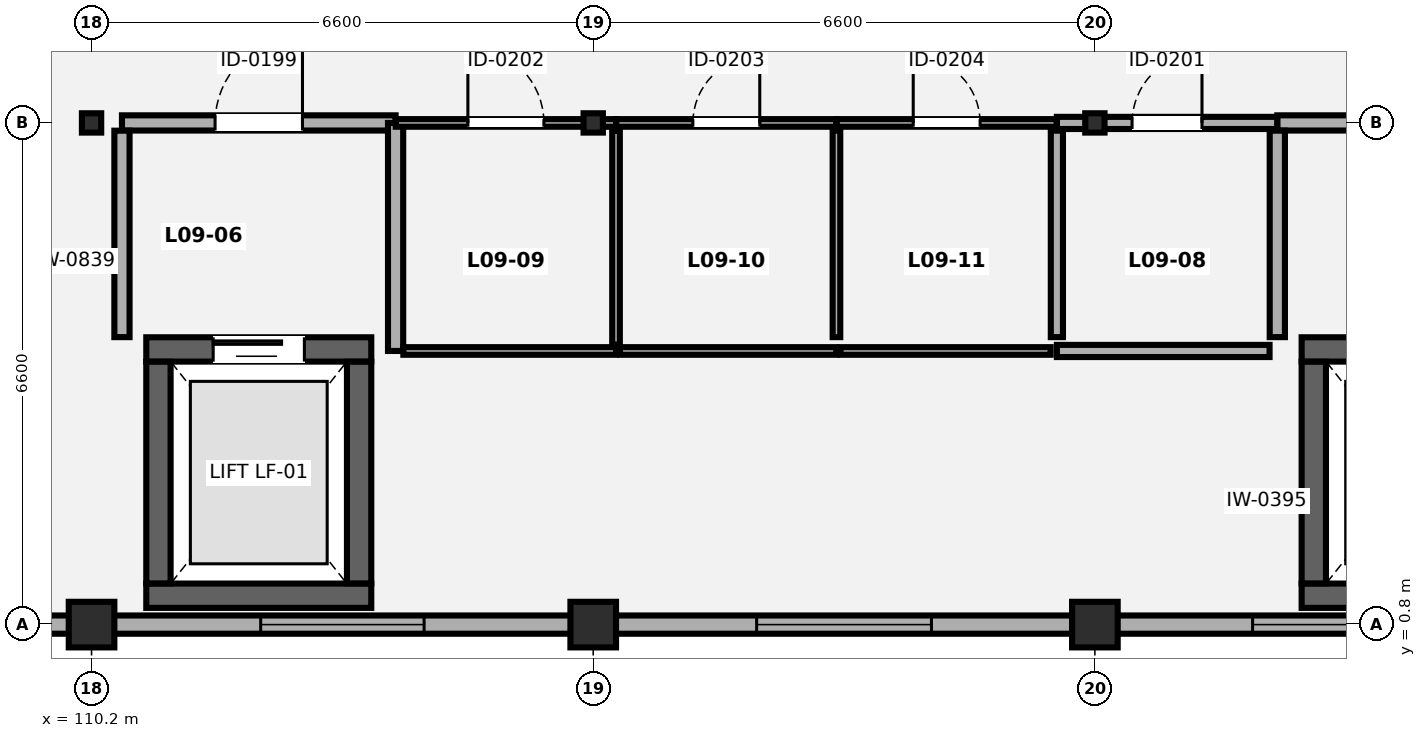
"""IFC4 building model, lengths in metres.
Left out: names, types, materials, properties, quantities, classifications, styles, units other than length and angle.
Written with IfcOpenShell. Run it as: python <this file> out.ifc"""

import sys

from ifc_helpers import new_model, si_unit, direction, frame, frame_2d, origin, origin_2d, place, context, subcontext, project, spatial, rectangle, circle, i_section, extrude, element, fill, save


model = new_model("IFC4")
c1 = context("Model", 3, precision=1e-05, world=origin(), true_north=direction((0.0, 1.0)))
c2 = subcontext(c1, "Body", "Model", "MODEL_VIEW")
j1 = project(units=[si_unit("LENGTHUNIT", "METRE"), si_unit("PLANEANGLEUNIT", "RADIAN")], contexts=[c1])
p1 = place(None, origin())
s1 = spatial("IfcSite", under=j1, at=p1, CompositionType="ELEMENT")
p2 = place(p1, origin())
s2 = spatial("IfcBuilding", under=s1, at=p2, CompositionType="ELEMENT")
p3 = place(p2, frame((0.0, 0.0, 38.15)))
s3 = spatial("IfcBuildingStorey", under=s2, at=p3, CompositionType="ELEMENT", Elevation=38.15)
p4 = place(p3, frame((110.2, 0.8, 0.0), z_axis=(0.0, 0.0, 1.0), x_axis=(1.0, 0.0, 0.0)))
e1 = element("IfcColumn", 1, at=p4, inside=s3, PredefinedType="PILASTER", context=c2, shape_type="SweptSolid", body=[
    extrude(circle(Radius=0.3, at=origin_2d()), origin(), (0.0, 0.0, 1.0), 3.85),
])
p5 = place(p3, frame((110.2, 7.4, 0.0), z_axis=(0.0, 0.0, 1.0), x_axis=(1.0, 0.0, 0.0)))
e2 = element("IfcColumn", 2, at=p5, inside=s3, PredefinedType="COLUMN", context=c2, shape_type="SweptSolid", body=[
    extrude(i_section(OverallWidth=0.254, OverallDepth=0.254, WebThickness=0.009, FlangeThickness=0.014, FilletRadius=0.014, at=origin_2d()), origin(), (0.0, 0.0, 1.0), 3.85),
])
p6 = place(p3, frame((116.8, 0.8, 0.0), z_axis=(0.0, 0.0, 1.0), x_axis=(1.0, 0.0, 0.0)))
e3 = element("IfcColumn", 3, at=p6, inside=s3, PredefinedType="PILASTER", context=c2, shape_type="SweptSolid", body=[
    extrude(circle(Radius=0.3, at=origin_2d()), origin(), (0.0, 0.0, 1.0), 3.85),
])
p7 = place(p3, frame((116.8, 7.4, 0.0), z_axis=(0.0, 0.0, 1.0), x_axis=(1.0, 0.0, 0.0)))
e4 = element("IfcColumn", 4, at=p7, inside=s3, PredefinedType="COLUMN", context=c2, shape_type="SweptSolid", body=[
    extrude(i_section(OverallWidth=0.254, OverallDepth=0.254, WebThickness=0.009, FlangeThickness=0.014, FilletRadius=0.014, at=origin_2d()), origin(), (0.0, 0.0, 1.0), 3.85),
])
p8 = place(p3, frame((123.4, 0.8, 0.0), z_axis=(0.0, 0.0, 1.0), x_axis=(1.0, 0.0, 0.0)))
e5 = element("IfcColumn", 5, at=p8, inside=s3, PredefinedType="PILASTER", context=c2, shape_type="SweptSolid", body=[
    extrude(circle(Radius=0.3, at=origin_2d()), origin(), (0.0, 0.0, 1.0), 3.85),
])
p9 = place(p3, frame((123.4, 7.4, 0.0), z_axis=(0.0, 0.0, 1.0), x_axis=(1.0, 0.0, 0.0)))
e6 = element("IfcColumn", 6, at=p9, inside=s3, PredefinedType="COLUMN", context=c2, shape_type="SweptSolid", body=[
    extrude(i_section(OverallWidth=0.254, OverallDepth=0.254, WebThickness=0.009, FlangeThickness=0.014, FilletRadius=0.014, at=origin_2d()), origin(), (0.0, 0.0, 1.0), 3.85),
])
p10 = place(p3, frame((149.502, 0.8, 0.0), z_axis=(0.0, 0.0, 1.0), x_axis=(-1.0, 0.0, 0.0)))
e7 = element("IfcWall", 7, at=p10, inside=s3, PredefinedType="SOLIDWALL", context=c2, shape_type="SweptSolid", body=[
    extrude(rectangle(XDim=45.604, YDim=0.24, at=frame_2d((22.802, 0.0))), origin(), (0.0, 0.0, 1.0), 3.155),
])
p11 = place(p10, frame((41.602, 0.0, 0.85)))
e8 = element("IfcOpeningElement", 8, at=p11, cuts=e7, PredefinedType="OPENING", context=c2, shape_type="SweptSolid", body=[
    extrude(rectangle(XDim=2.0, YDim=1.4, at=frame_2d((1.0, 0.7))), frame((0.0, 0.13, 0.0), z_axis=(0.0, -1.0, 0.0), x_axis=(1.0, 0.0, 0.0)), (0.0, 0.0, 1.0), 0.26),
])
p12 = place(p10, frame((34.927, 0.0, 0.85)))
e9 = element("IfcOpeningElement", 9, at=p12, cuts=e7, PredefinedType="OPENING", context=c2, shape_type="SweptSolid", body=[
    extrude(rectangle(XDim=2.15, YDim=1.4, at=frame_2d((1.075, 0.7))), frame((0.0, 0.13, 0.0), z_axis=(0.0, -1.0, 0.0), x_axis=(1.0, 0.0, 0.0)), (0.0, 0.0, 1.0), 0.26),
])
p13 = place(p10, frame((28.252, 0.0, 0.85)))
e10 = element("IfcOpeningElement", 10, at=p13, cuts=e7, PredefinedType="OPENING", context=c2, shape_type="SweptSolid", body=[
    extrude(rectangle(XDim=2.3, YDim=1.4, at=frame_2d((1.15, 0.7))), frame((0.0, 0.13, 0.0), z_axis=(0.0, -1.0, 0.0), x_axis=(1.0, 0.0, 0.0)), (0.0, 0.0, 1.0), 0.26),
])
p14 = place(p10, frame((21.577, 0.0, 0.85)))
e11 = element("IfcOpeningElement", 11, at=p14, cuts=e7, PredefinedType="OPENING", context=c2, shape_type="SweptSolid", body=[
    extrude(rectangle(XDim=2.45, YDim=1.4, at=frame_2d((1.225, 0.7))), frame((0.0, 0.13, 0.0), z_axis=(0.0, -1.0, 0.0), x_axis=(1.0, 0.0, 0.0)), (0.0, 0.0, 1.0), 0.26),
])
p15 = place(p10, frame((15.602, 0.0, 0.85)))
e12 = element("IfcOpeningElement", 12, at=p15, cuts=e7, PredefinedType="OPENING", context=c2, shape_type="SweptSolid", body=[
    extrude(rectangle(XDim=1.2, YDim=1.25, at=frame_2d((0.6, 0.625))), frame((0.0, 0.13, 0.0), z_axis=(0.0, -1.0, 0.0), x_axis=(1.0, 0.0, 0.0)), (0.0, 0.0, 1.0), 0.26),
])
p16 = place(p10, frame((8.877, 0.0, 0.85)))
e13 = element("IfcOpeningElement", 13, at=p16, cuts=e7, PredefinedType="OPENING", context=c2, shape_type="SweptSolid", body=[
    extrude(rectangle(XDim=1.45, YDim=1.25, at=frame_2d((0.725, 0.625))), frame((0.0, 0.13, 0.0), z_axis=(0.0, -1.0, 0.0), x_axis=(1.0, 0.0, 0.0)), (0.0, 0.0, 1.0), 0.26),
])
p17 = place(p10, frame((2.177, 0.0, 0.85)))
e14 = element("IfcOpeningElement", 14, at=p17, cuts=e7, PredefinedType="OPENING", context=c2, shape_type="SweptSolid", body=[
    extrude(rectangle(XDim=1.65, YDim=1.25, at=frame_2d((0.825, 0.625))), frame((0.0, 0.13, 0.0), z_axis=(0.0, -1.0, 0.0), x_axis=(1.0, 0.0, 0.0)), (0.0, 0.0, 1.0), 0.26),
])
p18 = place(p3, frame((110.92, 1.18, 0.0), z_axis=(0.0, 0.0, 1.0), x_axis=(1.0, 0.0, 0.0)))
e15 = element("IfcWall", 15, at=p18, inside=s3, PredefinedType="SHEAR", context=c2, shape_type="SweptSolid", body=[
    extrude(rectangle(XDim=2.96, YDim=0.32, at=frame_2d((1.48, 0.0))), origin(), (0.0, 0.0, 1.0), 3.67),
])
p19 = place(p3, frame((110.92, 4.42, 0.0), z_axis=(0.0, 0.0, 1.0), x_axis=(1.0, 0.0, 0.0)))
e16 = element("IfcWall", 16, at=p19, inside=s3, PredefinedType="SHEAR", context=c2, shape_type="SweptSolid", body=[
    extrude(rectangle(XDim=2.96, YDim=0.32, at=frame_2d((1.48, 0.0))), origin(), (0.0, 0.0, 1.0), 3.67),
])
p20 = place(p19, frame((0.88, 0.0, 0.0)))
e17 = element("IfcOpeningElement", 17, at=p20, cuts=e16, PredefinedType="OPENING", context=c2, shape_type="SweptSolid", body=[
    extrude(rectangle(XDim=1.2, YDim=2.2, at=frame_2d((0.6, 1.1))), frame((0.0, 0.17, 0.0), z_axis=(0.0, -1.0, 0.0), x_axis=(1.0, 0.0, 0.0)), (0.0, 0.0, 1.0), 0.34),
])
for number, where, z_axis, x_axis in (
    (18, (111.08, 1.342, 0.0), (0.0, 0.0, 1.0), (0.0, 1.0, 0.0)),
    (19, (113.72, 1.342, 0.0), (0.0, 0.0, 1.0), (0.0, 1.0, 0.0)),
):
    element("IfcWall", number, at=place(p3, frame(where, z_axis=z_axis, x_axis=x_axis)), inside=s3, PredefinedType="SHEAR", context=c2, shape_type="SweptSolid", body=[
        extrude(rectangle(XDim=2.916, YDim=0.32, at=frame_2d((1.458, 0.0))), origin(), (0.0, 0.0, 1.0), 3.67),
    ])
p21 = place(p3, frame((126.12, 1.18, 0.0), z_axis=(0.0, 0.0, 1.0), x_axis=(1.0, 0.0, 0.0)))
e20 = element("IfcWall", 20, at=p21, inside=s3, PredefinedType="SHEAR", context=c2, shape_type="SweptSolid", body=[
    extrude(rectangle(XDim=2.96, YDim=0.32, at=frame_2d((1.48, 0.0))), origin(), (0.0, 0.0, 1.0), 3.67),
])
p22 = place(p3, frame((126.12, 4.42, 0.0), z_axis=(0.0, 0.0, 1.0), x_axis=(1.0, 0.0, 0.0)))
e21 = element("IfcWall", 21, at=p22, inside=s3, PredefinedType="SHEAR", context=c2, shape_type="SweptSolid", body=[
    extrude(rectangle(XDim=2.96, YDim=0.32, at=frame_2d((1.48, 0.0))), origin(), (0.0, 0.0, 1.0), 3.67),
])
p23 = place(p22, frame((0.88, 0.0, 0.0)))
e22 = element("IfcOpeningElement", 22, at=p23, cuts=e21, PredefinedType="OPENING", context=c2, shape_type="SweptSolid", body=[
    extrude(rectangle(XDim=1.2, YDim=2.2, at=frame_2d((0.6, 1.1))), frame((0.0, 0.17, 0.0), z_axis=(0.0, -1.0, 0.0), x_axis=(1.0, 0.0, 0.0)), (0.0, 0.0, 1.0), 0.34),
])
p24 = place(p3, frame((126.28, 1.342, 0.0), z_axis=(0.0, 0.0, 1.0), x_axis=(0.0, 1.0, 0.0)))
e23 = element("IfcWall", 23, at=p24, inside=s3, PredefinedType="SHEAR", context=c2, shape_type="SweptSolid", body=[
    extrude(rectangle(XDim=2.916, YDim=0.32, at=frame_2d((1.458, 0.0))), origin(), (0.0, 0.0, 1.0), 3.67),
])
p25 = place(p3, frame((110.6, 7.4, 0.0), z_axis=(0.0, 0.0, 1.0), x_axis=(1.0, 0.0, 0.0)))
e24 = element("IfcWall", 24, at=p25, inside=s3, PredefinedType="SOLIDWALL", context=c2, shape_type="SweptSolid", body=[
    extrude(rectangle(XDim=3.6, YDim=0.2, at=frame_2d((1.8, 0.0))), origin(), (0.0, 0.0, 1.0), 2.943),
])
p26 = place(p25, frame((1.225, 0.0, 0.0)))
e25 = element("IfcOpeningElement", 25, at=p26, cuts=e24, PredefinedType="OPENING", context=c2, shape_type="SweptSolid", body=[
    extrude(rectangle(XDim=1.15, YDim=2.15, at=frame_2d((0.575, 1.075))), frame((0.0, 0.11, 0.0), z_axis=(0.0, -1.0, 0.0), x_axis=(1.0, 0.0, 0.0)), (0.0, 0.0, 1.0), 0.22),
])
p27 = place(p3, frame((110.6, 4.582, 0.0), z_axis=(0.0, 0.0, 1.0), x_axis=(0.0, 1.0, 0.0)))
e26 = element("IfcWall", 26, at=p27, inside=s3, PredefinedType="SOLIDWALL", context=c2, shape_type="SweptSolid", body=[
    extrude(rectangle(XDim=2.716, YDim=0.2, at=frame_2d((1.358, 0.0))), origin(), (0.0, 0.0, 1.0), 3.67),
])
p28 = place(p3, frame((114.2, 4.4, 0.0), z_axis=(0.0, 0.0, 1.0), x_axis=(0.0, 1.0, 0.0)))
e27 = element("IfcWall", 27, at=p28, inside=s3, PredefinedType="SOLIDWALL", context=c2, shape_type="SweptSolid", body=[
    extrude(rectangle(XDim=3.0, YDim=0.2, at=frame_2d((1.5, 0.0))), origin(), (0.0, 0.0, 1.0), 3.67),
])
p29 = place(p3, frame((125.8, 7.4, 0.0), z_axis=(0.0, 0.0, 1.0), x_axis=(1.0, 0.0, 0.0)))
e28 = element("IfcWall", 28, at=p29, inside=s3, PredefinedType="SOLIDWALL", context=c2, shape_type="SweptSolid", body=[
    extrude(rectangle(XDim=3.6, YDim=0.2, at=frame_2d((1.8, 0.0))), origin(), (0.0, 0.0, 1.0), 2.943),
])
p30 = place(p29, frame((1.225, 0.0, 0.0)))
e29 = element("IfcOpeningElement", 29, at=p30, cuts=e28, PredefinedType="OPENING", context=c2, shape_type="SweptSolid", body=[
    extrude(rectangle(XDim=1.15, YDim=2.15, at=frame_2d((0.575, 1.075))), frame((0.0, 0.11, 0.0), z_axis=(0.0, -1.0, 0.0), x_axis=(1.0, 0.0, 0.0)), (0.0, 0.0, 1.0), 0.22),
])
p31 = place(p3, frame((125.8, 4.582, 0.0), z_axis=(0.0, 0.0, 1.0), x_axis=(0.0, 1.0, 0.0)))
e30 = element("IfcWall", 30, at=p31, inside=s3, PredefinedType="SOLIDWALL", context=c2, shape_type="SweptSolid", body=[
    extrude(rectangle(XDim=2.716, YDim=0.2, at=frame_2d((1.358, 0.0))), origin(), (0.0, 0.0, 1.0), 3.67),
])
p32 = place(p3, frame((122.9, 4.4, 0.0), z_axis=(0.0, 0.0, 1.0), x_axis=(1.0, 0.0, 0.0)))
e31 = element("IfcWall", 31, at=p32, inside=s3, PredefinedType="PARTITIONING", context=c2, shape_type="SweptSolid", body=[
    extrude(rectangle(XDim=2.798, YDim=0.16, at=frame_2d((1.399, 0.0))), origin(), (0.0, 0.0, 1.0), 3.196),
])
p33 = place(p3, frame((122.9, 7.4, 0.0), z_axis=(0.0, 0.0, 1.0), x_axis=(1.0, 0.0, 0.0)))
e32 = element("IfcWall", 32, at=p33, inside=s3, PredefinedType="PARTITIONING", context=c2, shape_type="SweptSolid", body=[
    extrude(rectangle(XDim=2.898, YDim=0.16, at=frame_2d((1.449, 0.0))), origin(), (0.0, 0.0, 1.0), 2.943),
])
p34 = place(p33, frame((0.989, 0.0, 0.0)))
e33 = element("IfcOpeningElement", 33, at=p34, cuts=e32, PredefinedType="OPENING", context=c2, shape_type="SweptSolid", body=[
    extrude(rectangle(XDim=0.92, YDim=2.12, at=frame_2d((0.46, 1.06))), frame((0.0, 0.09, 0.0), z_axis=(0.0, -1.0, 0.0), x_axis=(1.0, 0.0, 0.0)), (0.0, 0.0, 1.0), 0.18),
])
p35 = place(p3, frame((122.9, 4.582, 0.0), z_axis=(0.0, 0.0, 1.0), x_axis=(0.0, 1.0, 0.0)))
e34 = element("IfcWall", 34, at=p35, inside=s3, PredefinedType="PARTITIONING", context=c2, shape_type="SweptSolid", body=[
    extrude(rectangle(XDim=2.716, YDim=0.16, at=frame_2d((1.358, 0.0))), origin(), (0.0, 0.0, 1.0), 3.67),
])
p36 = place(p3, frame((114.302, 4.4, 0.0), z_axis=(0.0, 0.0, 1.0), x_axis=(1.0, 0.0, 0.0)))
e35 = element("IfcWall", 35, at=p36, inside=s3, PredefinedType="PARTITIONING", context=c2, shape_type="SweptSolid", body=[
    extrude(rectangle(XDim=2.798, YDim=0.1, at=frame_2d((1.399, 0.0))), origin(), (0.0, 0.0, 1.0), 3.67),
])
p37 = place(p3, frame((114.202, 7.4, 0.0), z_axis=(0.0, 0.0, 1.0), x_axis=(1.0, 0.0, 0.0)))
e36 = element("IfcWall", 36, at=p37, inside=s3, PredefinedType="PARTITIONING", context=c2, shape_type="SweptSolid", body=[
    extrude(rectangle(XDim=2.898, YDim=0.1, at=frame_2d((1.449, 0.0))), origin(), (0.0, 0.0, 1.0), 2.943),
])
p38 = place(p37, frame((0.949, 0.0, 0.0)))
e37 = element("IfcOpeningElement", 37, at=p38, cuts=e36, PredefinedType="OPENING", context=c2, shape_type="SweptSolid", body=[
    extrude(rectangle(XDim=1.0, YDim=2.1, at=frame_2d((0.5, 1.05))), frame((0.0, 0.06, 0.0), z_axis=(0.0, -1.0, 0.0), x_axis=(1.0, 0.0, 0.0)), (0.0, 0.0, 1.0), 0.12),
])
p39 = place(p3, frame((117.1, 4.482, 0.0), z_axis=(0.0, 0.0, 1.0), x_axis=(0.0, 1.0, 0.0)))
e38 = element("IfcWall", 38, at=p39, inside=s3, PredefinedType="PARTITIONING", context=c2, shape_type="SweptSolid", body=[
    extrude(rectangle(XDim=2.816, YDim=0.1, at=frame_2d((1.408, 0.0))), origin(), (0.0, 0.0, 1.0), 3.67),
])
p40 = place(p3, frame((117.152, 4.4, 0.0), z_axis=(0.0, 0.0, 1.0), x_axis=(1.0, 0.0, 0.0)))
e39 = element("IfcWall", 39, at=p40, inside=s3, PredefinedType="PARTITIONING", context=c2, shape_type="SweptSolid", body=[
    extrude(rectangle(XDim=2.848, YDim=0.1, at=frame_2d((1.424, 0.0))), origin(), (0.0, 0.0, 1.0), 3.67),
])
p41 = place(p3, frame((117.102, 7.4, 0.0), z_axis=(0.0, 0.0, 1.0), x_axis=(1.0, 0.0, 0.0)))
e40 = element("IfcWall", 40, at=p41, inside=s3, PredefinedType="PARTITIONING", context=c2, shape_type="SweptSolid", body=[
    extrude(rectangle(XDim=2.898, YDim=0.1, at=frame_2d((1.449, 0.0))), origin(), (0.0, 0.0, 1.0), 2.943),
])
p42 = place(p41, frame((1.009, 0.0, 0.0)))
e41 = element("IfcOpeningElement", 41, at=p42, cuts=e40, PredefinedType="OPENING", context=c2, shape_type="SweptSolid", body=[
    extrude(rectangle(XDim=0.88, YDim=2.08, at=frame_2d((0.44, 1.04))), frame((0.0, 0.06, 0.0), z_axis=(0.0, -1.0, 0.0), x_axis=(1.0, 0.0, 0.0)), (0.0, 0.0, 1.0), 0.12),
])
p43 = place(p3, frame((120.0, 4.582, 0.0), z_axis=(0.0, 0.0, 1.0), x_axis=(0.0, 1.0, 0.0)))
e42 = element("IfcWall", 42, at=p43, inside=s3, PredefinedType="PARTITIONING", context=c2, shape_type="SweptSolid", body=[
    extrude(rectangle(XDim=2.716, YDim=0.1, at=frame_2d((1.358, 0.0))), origin(), (0.0, 0.0, 1.0), 3.67),
])
p44 = place(p3, frame((120.052, 4.4, 0.0), z_axis=(0.0, 0.0, 1.0), x_axis=(1.0, 0.0, 0.0)))
e43 = element("IfcWall", 43, at=p44, inside=s3, PredefinedType="PARTITIONING", context=c2, shape_type="SweptSolid", body=[
    extrude(rectangle(XDim=2.766, YDim=0.1, at=frame_2d((1.383, 0.0))), origin(), (0.0, 0.0, 1.0), 3.67),
])
p45 = place(p3, frame((120.002, 7.4, 0.0), z_axis=(0.0, 0.0, 1.0), x_axis=(1.0, 0.0, 0.0)))
e44 = element("IfcWall", 44, at=p45, inside=s3, PredefinedType="PARTITIONING", context=c2, shape_type="SweptSolid", body=[
    extrude(rectangle(XDim=2.896, YDim=0.1, at=frame_2d((1.448, 0.0))), origin(), (0.0, 0.0, 1.0), 2.943),
])
p46 = place(p45, frame((1.008, 0.0, 0.0)))
e45 = element("IfcOpeningElement", 45, at=p46, cuts=e44, PredefinedType="OPENING", context=c2, shape_type="SweptSolid", body=[
    extrude(rectangle(XDim=0.88, YDim=2.08, at=frame_2d((0.44, 1.04))), frame((0.0, 0.06, 0.0), z_axis=(0.0, -1.0, 0.0), x_axis=(1.0, 0.0, 0.0)), (0.0, 0.0, 1.0), 0.12),
])
p47 = place(p12, origin())
e46 = element("IfcWindow", 46, at=p47, inside=s3, PartitioningType="SINGLE_PANEL", PredefinedType="WINDOW", context=c2, shape_type="SweptSolid", body=[
    extrude(rectangle(XDim=2.15, YDim=1.4, at=frame_2d((1.075, 0.7))), frame((0.0, 0.03, 0.0), z_axis=(0.0, -1.0, 0.0), x_axis=(1.0, 0.0, 0.0)), (0.0, 0.0, 1.0), 0.06),
])
fill(e9, e46)
p48 = place(p13, origin())
e47 = element("IfcWindow", 47, at=p48, inside=s3, PartitioningType="SINGLE_PANEL", PredefinedType="WINDOW", context=c2, shape_type="SweptSolid", body=[
    extrude(rectangle(XDim=2.3, YDim=1.4, at=frame_2d((1.15, 0.7))), frame((0.0, 0.03, 0.0), z_axis=(0.0, -1.0, 0.0), x_axis=(1.0, 0.0, 0.0)), (0.0, 0.0, 1.0), 0.06),
])
fill(e10, e47)
p49 = place(p14, origin())
e48 = element("IfcWindow", 48, at=p49, inside=s3, PartitioningType="SINGLE_PANEL", PredefinedType="WINDOW", context=c2, shape_type="SweptSolid", body=[
    extrude(rectangle(XDim=2.45, YDim=1.4, at=frame_2d((1.225, 0.7))), frame((0.0, 0.03, 0.0), z_axis=(0.0, -1.0, 0.0), x_axis=(1.0, 0.0, 0.0)), (0.0, 0.0, 1.0), 0.06),
])
fill(e11, e48)
p50 = place(p20, origin())
e49 = element("IfcDoor", 49, at=p50, inside=s3, OperationType="SLIDING_TO_LEFT", PredefinedType="DOOR", context=c2, shape_type="SweptSolid", body=[
    extrude(rectangle(XDim=1.2, YDim=2.2, at=frame_2d((0.6, 1.1))), frame((0.0, 0.025, 0.0), z_axis=(0.0, -1.0, 0.0), x_axis=(1.0, 0.0, 0.0)), (0.0, 0.0, 1.0), 0.05),
])
fill(e17, e49)
p51 = place(p26, origin())
e50 = element("IfcDoor", 50, at=p51, inside=s3, OperationType="SINGLE_SWING_RIGHT", PredefinedType="DOOR", context=c2, shape_type="SweptSolid", body=[
    extrude(rectangle(XDim=1.15, YDim=2.15, at=frame_2d((0.575, 1.075))), frame((0.0, 0.025, 0.0), z_axis=(0.0, -1.0, 0.0), x_axis=(1.0, 0.0, 0.0)), (0.0, 0.0, 1.0), 0.05),
])
fill(e25, e50)
p52 = place(p34, origin())
e51 = element("IfcDoor", 51, at=p52, inside=s3, OperationType="SINGLE_SWING_RIGHT", PredefinedType="DOOR", context=c2, shape_type="SweptSolid", body=[
    extrude(rectangle(XDim=0.92, YDim=2.12, at=frame_2d((0.46, 1.06))), frame((0.0, 0.025, 0.0), z_axis=(0.0, -1.0, 0.0), x_axis=(1.0, 0.0, 0.0)), (0.0, 0.0, 1.0), 0.05),
])
fill(e33, e51)
p53 = place(p38, origin())
e52 = element("IfcDoor", 52, at=p53, inside=s3, OperationType="SINGLE_SWING_LEFT", PredefinedType="DOOR", context=c2, shape_type="SweptSolid", body=[
    extrude(rectangle(XDim=1.0, YDim=2.1, at=frame_2d((0.5, 1.05))), frame((0.0, 0.025, 0.0), z_axis=(0.0, -1.0, 0.0), x_axis=(1.0, 0.0, 0.0)), (0.0, 0.0, 1.0), 0.05),
])
fill(e37, e52)
p54 = place(p42, origin())
e53 = element("IfcDoor", 53, at=p54, inside=s3, OperationType="SINGLE_SWING_RIGHT", PredefinedType="DOOR", context=c2, shape_type="SweptSolid", body=[
    extrude(rectangle(XDim=0.88, YDim=2.08, at=frame_2d((0.44, 1.04))), frame((0.0, 0.025, 0.0), z_axis=(0.0, -1.0, 0.0), x_axis=(1.0, 0.0, 0.0)), (0.0, 0.0, 1.0), 0.05),
])
fill(e41, e53)
p55 = place(p46, origin())
e54 = element("IfcDoor", 54, at=p55, inside=s3, OperationType="SINGLE_SWING_LEFT", PredefinedType="DOOR", context=c2, shape_type="SweptSolid", body=[
    extrude(rectangle(XDim=0.88, YDim=2.08, at=frame_2d((0.44, 1.04))), frame((0.0, 0.025, 0.0), z_axis=(0.0, -1.0, 0.0), x_axis=(1.0, 0.0, 0.0)), (0.0, 0.0, 1.0), 0.05),
])
fill(e45, e54)
save(model, sys.argv[1])
